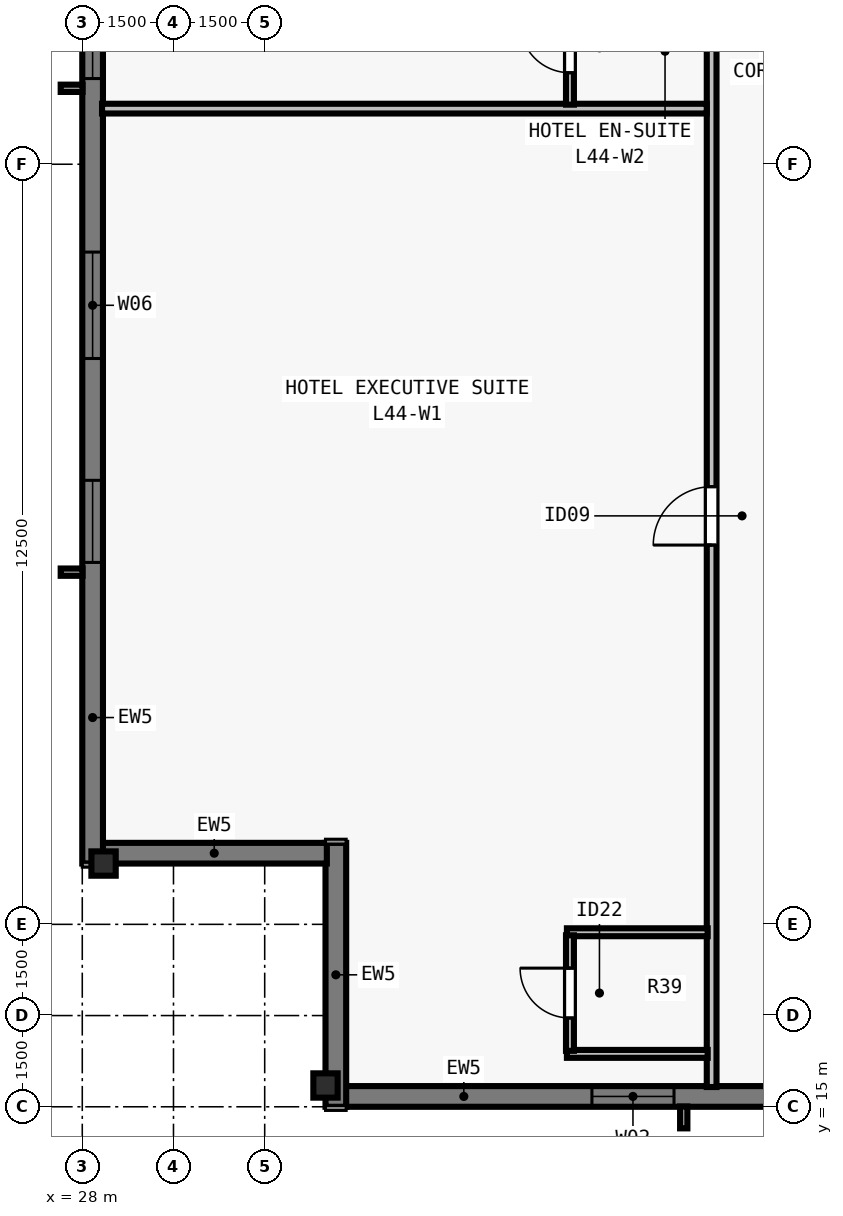
"""IFC4 building model, lengths in metres.
Left out: names, types, materials, properties, quantities, classifications, styles, units other than length and angle.
Written with IfcOpenShell. Run it as: python <this file> out.ifc"""

import sys

from ifc_helpers import new_model, si_unit, direction, frame, frame_2d, origin, origin_2d, place, context, subcontext, project, spatial, rectangle, i_section, extrude, element, fill, save


model = new_model("IFC4")
c1 = context("Model", 3, precision=1e-05, world=origin(), true_north=direction((0.0, 1.0)))
c2 = subcontext(c1, "Body", "Model", "MODEL_VIEW")
j1 = project(units=[si_unit("LENGTHUNIT", "METRE"), si_unit("PLANEANGLEUNIT", "RADIAN")], contexts=[c1])
p1 = place(None, origin())
s1 = spatial("IfcSite", under=j1, at=p1, CompositionType="ELEMENT")
p2 = place(p1, origin())
s2 = spatial("IfcBuilding", under=s1, at=p2, CompositionType="ELEMENT")
p3 = place(p2, frame((0.0, 0.0, 162.0)))
s3 = spatial("IfcBuildingStorey", under=s2, at=p3, CompositionType="ELEMENT", Elevation=162.0)
for number, where, z_axis, x_axis in (
    (1, (32.0, 15.35, 0.0), (0.0, 0.0, 1.0), (1.0, 0.0, 0.0)),
    (2, (28.35, 19.0, 0.0), (0.0, 0.0, 1.0), (0.0, 1.0, 0.0)),
):
    element("IfcColumn", number, at=place(p3, frame(where, z_axis=z_axis, x_axis=x_axis)), inside=s3, PredefinedType="COLUMN", context=c2, shape_type="SweptSolid", body=[
        extrude(i_section(OverallWidth=0.4, OverallDepth=0.4, WebThickness=0.022, FlangeThickness=0.036, at=origin_2d()), origin(), (0.0, 0.0, 1.0), 3.5),
    ])
p4 = place(p3, frame((57.4, 15.17, 0.0), z_axis=(0.0, 0.0, 1.0), x_axis=(-1.0, 0.0, 0.0)))
e3 = element("IfcWall", 3, at=p4, inside=s3, PredefinedType="SOLIDWALL", context=c2, shape_type="SweptSolid", body=[
    extrude(rectangle(XDim=25.082, YDim=0.34, at=frame_2d((12.541, 0.0))), origin(), (0.0, 0.0, 1.0), 3.28),
])
p5 = place(p4, frame((4.913, 0.0, 0.8)))
e4 = element("IfcOpeningElement", 4, at=p5, cuts=e3, PredefinedType="OPENING", context=c2, shape_type="SweptSolid", body=[
    extrude(rectangle(XDim=1.35, YDim=1.66, at=frame_2d((0.675, 0.83))), frame((0.0, 0.18, 0.0), z_axis=(0.0, -1.0, 0.0), x_axis=(1.0, 0.0, 0.0)), (0.0, 0.0, 1.0), 0.36),
])
p6 = place(p4, frame((12.716, 0.0, 0.8)))
e5 = element("IfcOpeningElement", 5, at=p6, cuts=e3, PredefinedType="OPENING", context=c2, shape_type="SweptSolid", body=[
    extrude(rectangle(XDim=1.35, YDim=1.66, at=frame_2d((0.675, 0.83))), frame((0.0, 0.18, 0.0), z_axis=(0.0, -1.0, 0.0), x_axis=(1.0, 0.0, 0.0)), (0.0, 0.0, 1.0), 0.36),
])
p7 = place(p4, frame((14.692, 0.0, 0.8)))
e6 = element("IfcOpeningElement", 6, at=p7, cuts=e3, PredefinedType="OPENING", context=c2, shape_type="SweptSolid", body=[
    extrude(rectangle(XDim=1.75, YDim=1.66, at=frame_2d((0.875, 0.83))), frame((0.0, 0.18, 0.0), z_axis=(0.0, -1.0, 0.0), x_axis=(1.0, 0.0, 0.0)), (0.0, 0.0, 1.0), 0.36),
])
p8 = place(p4, frame((19.669, 0.0, 0.8)))
e7 = element("IfcOpeningElement", 7, at=p8, cuts=e3, PredefinedType="OPENING", context=c2, shape_type="SweptSolid", body=[
    extrude(rectangle(XDim=1.35, YDim=1.66, at=frame_2d((0.675, 0.83))), frame((0.0, 0.18, 0.0), z_axis=(0.0, -1.0, 0.0), x_axis=(1.0, 0.0, 0.0)), (0.0, 0.0, 1.0), 0.36),
])
p9 = place(p4, frame((8.71, 0.0, 0.8)))
e8 = element("IfcOpeningElement", 8, at=p9, cuts=e3, PredefinedType="OPENING", context=c2, shape_type="SweptSolid", body=[
    extrude(rectangle(XDim=0.75, YDim=1.66, at=frame_2d((0.375, 0.83))), frame((0.0, 0.18, 0.0), z_axis=(0.0, -1.0, 0.0), x_axis=(1.0, 0.0, 0.0)), (0.0, 0.0, 1.0), 0.36),
])
p10 = place(p4, frame((1.27, 0.0, 0.8)))
e9 = element("IfcOpeningElement", 9, at=p10, cuts=e3, PredefinedType="OPENING", context=c2, shape_type="SweptSolid", body=[
    extrude(rectangle(XDim=0.9, YDim=1.66, at=frame_2d((0.45, 0.83))), frame((0.0, 0.18, 0.0), z_axis=(0.0, -1.0, 0.0), x_axis=(1.0, 0.0, 0.0)), (0.0, 0.0, 1.0), 0.36),
])
p11 = place(p3, frame((32.17, 15.0, 0.0), z_axis=(0.0, 0.0, 1.0), x_axis=(0.0, 1.0, 0.0)))
e10 = element("IfcWall", 10, at=p11, inside=s3, PredefinedType="SOLIDWALL", context=c2, shape_type="SweptSolid", body=[
    extrude(rectangle(XDim=4.34, YDim=0.34, at=frame_2d((2.17, 0.0))), origin(), (0.0, 0.0, 1.0), 3.28),
])
p12 = place(p3, frame((32.022, 19.17, 0.0), z_axis=(0.0, 0.0, 1.0), x_axis=(-1.0, 0.0, 0.0)))
e11 = element("IfcWall", 11, at=p12, inside=s3, PredefinedType="SOLIDWALL", context=c2, shape_type="SweptSolid", body=[
    extrude(rectangle(XDim=3.704, YDim=0.34, at=frame_2d((1.852, 0.0))), origin(), (0.0, 0.0, 1.0), 3.28),
])
p13 = place(p3, frame((28.17, 19.0, 0.0), z_axis=(0.0, 0.0, 1.0), x_axis=(0.0, 1.0, 0.0)))
e12 = element("IfcWall", 12, at=p13, inside=s3, PredefinedType="SOLIDWALL", context=c2, shape_type="SweptSolid", body=[
    extrude(rectangle(XDim=39.682, YDim=0.34, at=frame_2d((19.841, 0.0))), origin(), (0.0, 0.0, 1.0), 3.28),
])
p14 = place(p13, frame((4.952, 0.0, 0.8)))
e13 = element("IfcOpeningElement", 13, at=p14, cuts=e12, PredefinedType="OPENING", context=c2, shape_type="SweptSolid", body=[
    extrude(rectangle(XDim=1.35, YDim=1.66, at=frame_2d((0.675, 0.83))), frame((0.0, 0.18, 0.0), z_axis=(0.0, -1.0, 0.0), x_axis=(1.0, 0.0, 0.0)), (0.0, 0.0, 1.0), 0.36),
])
p15 = place(p13, frame((8.305, 0.0, 0.8)))
e14 = element("IfcOpeningElement", 14, at=p15, cuts=e12, PredefinedType="OPENING", context=c2, shape_type="SweptSolid", body=[
    extrude(rectangle(XDim=1.75, YDim=1.66, at=frame_2d((0.875, 0.83))), frame((0.0, 0.18, 0.0), z_axis=(0.0, -1.0, 0.0), x_axis=(1.0, 0.0, 0.0)), (0.0, 0.0, 1.0), 0.36),
])
p16 = place(p13, frame((12.909, 0.0, 0.8)))
e15 = element("IfcOpeningElement", 15, at=p16, cuts=e12, PredefinedType="OPENING", context=c2, shape_type="SweptSolid", body=[
    extrude(rectangle(XDim=1.35, YDim=1.66, at=frame_2d((0.675, 0.83))), frame((0.0, 0.18, 0.0), z_axis=(0.0, -1.0, 0.0), x_axis=(1.0, 0.0, 0.0)), (0.0, 0.0, 1.0), 0.36),
])
p17 = place(p13, frame((16.262, 0.0, 0.8)))
e16 = element("IfcOpeningElement", 16, at=p17, cuts=e12, PredefinedType="OPENING", context=c2, shape_type="SweptSolid", body=[
    extrude(rectangle(XDim=1.75, YDim=1.66, at=frame_2d((0.875, 0.83))), frame((0.0, 0.18, 0.0), z_axis=(0.0, -1.0, 0.0), x_axis=(1.0, 0.0, 0.0)), (0.0, 0.0, 1.0), 0.36),
])
p18 = place(p13, frame((19.166, 0.0, 0.8)))
e17 = element("IfcOpeningElement", 17, at=p18, cuts=e12, PredefinedType="OPENING", context=c2, shape_type="SweptSolid", body=[
    extrude(rectangle(XDim=1.35, YDim=1.66, at=frame_2d((0.675, 0.83))), frame((0.0, 0.18, 0.0), z_axis=(0.0, -1.0, 0.0), x_axis=(1.0, 0.0, 0.0)), (0.0, 0.0, 1.0), 0.36),
])
p19 = place(p13, frame((22.07, 0.0, 0.8)))
e18 = element("IfcOpeningElement", 18, at=p19, cuts=e12, PredefinedType="OPENING", context=c2, shape_type="SweptSolid", body=[
    extrude(rectangle(XDim=1.75, YDim=1.66, at=frame_2d((0.875, 0.83))), frame((0.0, 0.18, 0.0), z_axis=(0.0, -1.0, 0.0), x_axis=(1.0, 0.0, 0.0)), (0.0, 0.0, 1.0), 0.36),
])
p20 = place(p13, frame((25.823, 0.0, 0.8)))
e19 = element("IfcOpeningElement", 19, at=p20, cuts=e12, PredefinedType="OPENING", context=c2, shape_type="SweptSolid", body=[
    extrude(rectangle(XDim=1.35, YDim=1.66, at=frame_2d((0.675, 0.83))), frame((0.0, 0.18, 0.0), z_axis=(0.0, -1.0, 0.0), x_axis=(1.0, 0.0, 0.0)), (0.0, 0.0, 1.0), 0.36),
])
p21 = place(p13, frame((29.627, 0.0, 0.8)))
e20 = element("IfcOpeningElement", 20, at=p21, cuts=e12, PredefinedType="OPENING", context=c2, shape_type="SweptSolid", body=[
    extrude(rectangle(XDim=1.75, YDim=1.66, at=frame_2d((0.875, 0.83))), frame((0.0, 0.18, 0.0), z_axis=(0.0, -1.0, 0.0), x_axis=(1.0, 0.0, 0.0)), (0.0, 0.0, 1.0), 0.36),
])
p22 = place(p13, frame((33.38, 0.0, 0.8)))
e21 = element("IfcOpeningElement", 21, at=p22, cuts=e12, PredefinedType="OPENING", context=c2, shape_type="SweptSolid", body=[
    extrude(rectangle(XDim=1.35, YDim=1.66, at=frame_2d((0.675, 0.83))), frame((0.0, 0.18, 0.0), z_axis=(0.0, -1.0, 0.0), x_axis=(1.0, 0.0, 0.0)), (0.0, 0.0, 1.0), 0.36),
])
p23 = place(p3, frame((38.35, 15.325, 0.0), z_axis=(0.0, 0.0, 1.0), x_axis=(0.0, 1.0, 0.0)))
e22 = element("IfcWall", 22, at=p23, inside=s3, PredefinedType="PARTITIONING", context=c2, shape_type="SweptSolid", body=[
    extrude(rectangle(XDim=47.35, YDim=0.16, at=frame_2d((23.675, 0.0))), origin(), (0.0, 0.0, 1.0), 2.555),
])
p24 = place(p23, frame((8.912, 0.0, 0.0)))
e23 = element("IfcOpeningElement", 23, at=p24, cuts=e22, PredefinedType="OPENING", context=c2, shape_type="SweptSolid", body=[
    extrude(rectangle(XDim=0.96, YDim=2.15, at=frame_2d((0.48, 1.075))), frame((0.0, 0.09, 0.0), z_axis=(0.0, -1.0, 0.0), x_axis=(1.0, 0.0, 0.0)), (0.0, 0.0, 1.0), 0.18),
])
p25 = place(p23, frame((24.312, 0.0, 0.0)))
e24 = element("IfcOpeningElement", 24, at=p25, cuts=e22, PredefinedType="OPENING", context=c2, shape_type="SweptSolid", body=[
    extrude(rectangle(XDim=0.96, YDim=2.15, at=frame_2d((0.48, 1.075))), frame((0.0, 0.09, 0.0), z_axis=(0.0, -1.0, 0.0), x_axis=(1.0, 0.0, 0.0)), (0.0, 0.0, 1.0), 0.18),
])
p26 = place(p23, frame((39.895, 0.0, 0.0)))
e25 = element("IfcOpeningElement", 25, at=p26, cuts=e22, PredefinedType="OPENING", context=c2, shape_type="SweptSolid", body=[
    extrude(rectangle(XDim=0.96, YDim=2.15, at=frame_2d((0.48, 1.075))), frame((0.0, 0.09, 0.0), z_axis=(0.0, -1.0, 0.0), x_axis=(1.0, 0.0, 0.0)), (0.0, 0.0, 1.0), 0.18),
])
for number, where, z_axis, x_axis in (
    (26, (35.97, 15.87, 0.0), (0.0, 0.0, 1.0), (1.0, 0.0, 0.0)),
    (27, (35.97, 17.87, 0.0), (0.0, 0.0, 1.0), (1.0, 0.0, 0.0)),
):
    element("IfcWall", number, at=place(p3, frame(where, z_axis=z_axis, x_axis=x_axis)), inside=s3, PredefinedType="PLUMBINGWALL", context=c2, shape_type="SweptSolid", body=[
        extrude(rectangle(XDim=2.315, YDim=0.13, at=frame_2d((1.157, 0.0))), origin(), (0.0, 0.0, 1.0), 3.28),
    ])
p27 = place(p3, frame((36.02, 15.92, 0.0), z_axis=(0.0, 0.0, 1.0), x_axis=(0.0, 1.0, 0.0)))
e28 = element("IfcWall", 28, at=p27, inside=s3, PredefinedType="PLUMBINGWALL", context=c2, shape_type="SweptSolid", body=[
    extrude(rectangle(XDim=1.9, YDim=0.13, at=frame_2d((0.95, 0.0))), origin(), (0.0, 0.0, 1.0), 3.28),
])
p28 = place(p27, frame((0.54, 0.0, 0.0)))
e29 = element("IfcOpeningElement", 29, at=p28, cuts=e28, PredefinedType="OPENING", context=c2, shape_type="SweptSolid", body=[
    extrude(rectangle(XDim=0.82, YDim=2.1, at=frame_2d((0.41, 1.05))), frame((0.0, 0.075, 0.0), z_axis=(0.0, -1.0, 0.0), x_axis=(1.0, 0.0, 0.0)), (0.0, 0.0, 1.0), 0.15),
])
p29 = place(p3, frame((28.325, 31.415, 0.0), z_axis=(0.0, 0.0, 1.0), x_axis=(1.0, 0.0, 0.0)))
e30 = element("IfcWall", 30, at=p29, inside=s3, PredefinedType="PARTITIONING", context=c2, shape_type="SweptSolid", body=[
    extrude(rectangle(XDim=9.945, YDim=0.16, at=frame_2d((4.973, 0.0))), origin(), (0.0, 0.0, 1.0), 3.28),
])
p30 = place(p3, frame((36.02, 31.479, 0.0), z_axis=(0.0, 0.0, 1.0), x_axis=(0.0, 1.0, 0.0)))
e31 = element("IfcWall", 31, at=p30, inside=s3, PredefinedType="PLUMBINGWALL", context=c2, shape_type="SweptSolid", body=[
    extrude(rectangle(XDim=1.885, YDim=0.13, at=frame_2d((0.942, 0.0))), origin(), (0.0, 0.0, 1.0), 3.28),
])
p31 = place(p30, frame((0.525, 0.0, 0.0)))
e32 = element("IfcOpeningElement", 32, at=p31, cuts=e31, PredefinedType="OPENING", context=c2, shape_type="SweptSolid", body=[
    extrude(rectangle(XDim=0.82, YDim=2.1, at=frame_2d((0.41, 1.05))), frame((0.0, 0.075, 0.0), z_axis=(0.0, -1.0, 0.0), x_axis=(1.0, 0.0, 0.0)), (0.0, 0.0, 1.0), 0.15),
])
p32 = place(p8, origin())
e33 = element("IfcWindow", 33, at=p32, inside=s3, PartitioningType="SINGLE_PANEL", PredefinedType="WINDOW", context=c2, shape_type="SweptSolid", body=[
    extrude(rectangle(XDim=1.35, YDim=1.66, at=frame_2d((0.675, 0.83))), frame((0.0, -0.05, 0.0), z_axis=(0.0, -1.0, 0.0), x_axis=(1.0, 0.0, 0.0)), (0.0, 0.0, 1.0), 0.06),
])
fill(e7, e33)
p33 = place(p14, origin())
e34 = element("IfcWindow", 34, at=p33, inside=s3, PartitioningType="SINGLE_PANEL", PredefinedType="WINDOW", context=c2, shape_type="SweptSolid", body=[
    extrude(rectangle(XDim=1.35, YDim=1.66, at=frame_2d((0.675, 0.83))), frame((0.0, -0.05, 0.0), z_axis=(0.0, -1.0, 0.0), x_axis=(1.0, 0.0, 0.0)), (0.0, 0.0, 1.0), 0.06),
])
fill(e13, e34)
p34 = place(p15, origin())
e35 = element("IfcWindow", 35, at=p34, inside=s3, PartitioningType="SINGLE_PANEL", PredefinedType="WINDOW", context=c2, shape_type="SweptSolid", body=[
    extrude(rectangle(XDim=1.75, YDim=1.66, at=frame_2d((0.875, 0.83))), frame((0.0, -0.05, 0.0), z_axis=(0.0, -1.0, 0.0), x_axis=(1.0, 0.0, 0.0)), (0.0, 0.0, 1.0), 0.06),
])
fill(e14, e35)
p35 = place(p16, origin())
e36 = element("IfcWindow", 36, at=p35, inside=s3, PartitioningType="SINGLE_PANEL", PredefinedType="WINDOW", context=c2, shape_type="SweptSolid", body=[
    extrude(rectangle(XDim=1.35, YDim=1.66, at=frame_2d((0.675, 0.83))), frame((0.0, -0.05, 0.0), z_axis=(0.0, -1.0, 0.0), x_axis=(1.0, 0.0, 0.0)), (0.0, 0.0, 1.0), 0.06),
])
fill(e15, e36)
p36 = place(p28, origin())
e37 = element("IfcDoor", 37, at=p36, inside=s3, OperationType="SINGLE_SWING_RIGHT", PredefinedType="DOOR", context=c2, shape_type="SweptSolid", body=[
    extrude(rectangle(XDim=0.82, YDim=2.1, at=frame_2d((0.41, 1.05))), frame((0.0, 0.025, 0.0), z_axis=(0.0, -1.0, 0.0), x_axis=(1.0, 0.0, 0.0)), (0.0, 0.0, 1.0), 0.05),
])
fill(e29, e37)
p37 = place(p24, origin())
e38 = element("IfcDoor", 38, at=p37, inside=s3, OperationType="SINGLE_SWING_LEFT", PredefinedType="DOOR", context=c2, shape_type="SweptSolid", body=[
    extrude(rectangle(XDim=0.96, YDim=2.15, at=frame_2d((0.48, 1.075))), frame((0.0, 0.025, 0.0), z_axis=(0.0, -1.0, 0.0), x_axis=(1.0, 0.0, 0.0)), (0.0, 0.0, 1.0), 0.05),
])
fill(e23, e38)
p38 = place(p31, origin())
e39 = element("IfcDoor", 39, at=p38, inside=s3, OperationType="SINGLE_SWING_RIGHT", PredefinedType="DOOR", context=c2, shape_type="SweptSolid", body=[
    extrude(rectangle(XDim=0.82, YDim=2.1, at=frame_2d((0.41, 1.05))), frame((0.0, 0.025, 0.0), z_axis=(0.0, -1.0, 0.0), x_axis=(1.0, 0.0, 0.0)), (0.0, 0.0, 1.0), 0.05),
])
fill(e32, e39)
save(model, sys.argv[1])
